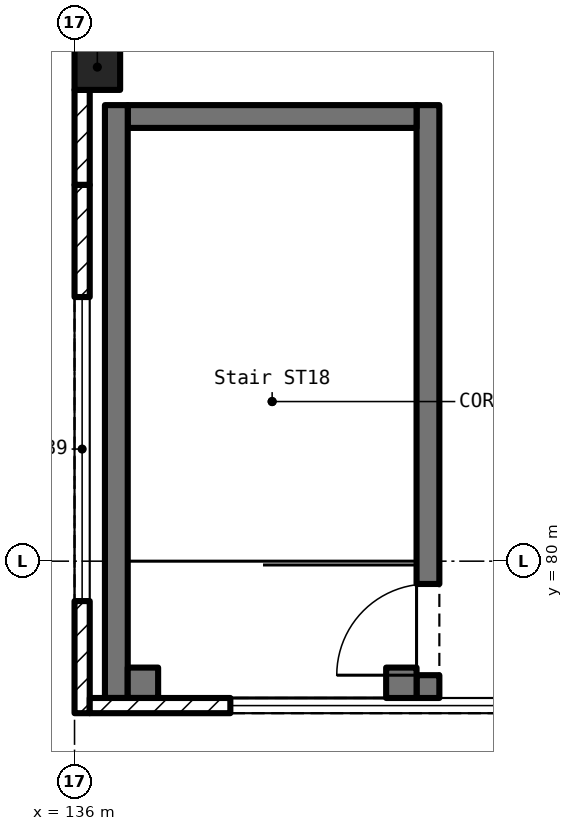
"""IFC4 building model, lengths in metres.
Left out: names, types, materials, properties, quantities, classifications, styles, units other than length and angle.
Written with IfcOpenShell. Run it as: python <this file> out.ifc"""

import sys

from ifc_helpers import new_model, si_unit, direction, frame, frame_2d, origin, origin_2d, place, context, subcontext, project, spatial, rectangle, extrude, element, fill, save


model = new_model("IFC4")
c1 = context("Model", 3, precision=1e-05, world=origin(), true_north=direction((0.0, 1.0)))
c2 = subcontext(c1, "Body", "Model", "MODEL_VIEW")
j1 = project(units=[si_unit("LENGTHUNIT", "METRE"), si_unit("PLANEANGLEUNIT", "RADIAN")], contexts=[c1])
p1 = place(None, origin())
s1 = spatial("IfcSite", under=j1, at=p1, CompositionType="ELEMENT")
p2 = place(p1, origin())
s2 = spatial("IfcBuilding", under=s1, at=p2, CompositionType="ELEMENT")
p3 = place(p2, frame((0.0, 0.0, 17.0)))
s3 = spatial("IfcBuildingStorey", under=s2, at=p3, CompositionType="ELEMENT", Elevation=17.0)
p4 = place(p3, frame((136.3, 86.5, 0.0), z_axis=(0.0, 0.0, 1.0), x_axis=(1.0, 0.0, 0.0)))
e1 = element("IfcColumn", 1, at=p4, inside=s3, PredefinedType="COLUMN", context=c2, shape_type="SweptSolid", body=[
    extrude(rectangle(XDim=0.6, YDim=0.6, at=origin_2d()), origin(), (0.0, 0.0, 1.0), 5.5),
])
p5 = place(p3, frame((136.1, 86.2, 0.0), z_axis=(0.0, 0.0, 1.0), x_axis=(0.0, -1.0, 0.0)))
e2 = element("IfcWall", 2, at=p5, inside=s3, PredefinedType="SOLIDWALL", context=c2, shape_type="SweptSolid", body=[
    extrude(rectangle(XDim=1.25, YDim=0.2, at=frame_2d((0.625, 0.0))), origin(), (0.0, 0.0, 1.0), 4.45),
])
p6 = place(p3, frame((136.1, 84.95, 0.0), z_axis=(0.0, 0.0, 1.0), x_axis=(0.0, -1.0, 0.0)))
e3 = element("IfcWall", 3, at=p6, inside=s3, PredefinedType="SOLIDWALL", context=c2, shape_type="SweptSolid", body=[
    extrude(rectangle(XDim=6.95, YDim=0.2, at=frame_2d((3.475, 0.0))), origin(), (0.0, 0.0, 1.0), 4.45),
])
p7 = place(p6, frame((1.475, 0.0, 1.0)))
e4 = element("IfcOpeningElement", 4, at=p7, cuts=e3, PredefinedType="OPENING", context=c2, shape_type="SweptSolid", body=[
    extrude(rectangle(XDim=4.0, YDim=1.8, at=frame_2d((2.0, 0.9))), frame((0.0, 0.112, 0.0), z_axis=(0.0, -1.0, 0.0), x_axis=(1.0, 0.0, 0.0)), (0.0, 0.0, 1.0), 0.224),
])
p8 = place(p3, frame((136.2, 78.1, 0.0), z_axis=(0.0, 0.0, 1.0), x_axis=(1.0, 0.0, 0.0)))
e5 = element("IfcWall", 5, at=p8, inside=s3, PredefinedType="SOLIDWALL", context=c2, shape_type="SweptSolid", body=[
    extrude(rectangle(XDim=7.7, YDim=0.2, at=frame_2d((3.85, 0.0))), origin(), (0.0, 0.0, 1.0), 4.45),
])
p9 = place(p8, frame((1.85, 0.0, 1.0)))
e6 = element("IfcOpeningElement", 6, at=p9, cuts=e5, PredefinedType="OPENING", context=c2, shape_type="SweptSolid", body=[
    extrude(rectangle(XDim=4.0, YDim=1.8, at=frame_2d((2.0, 0.9))), frame((0.0, 0.112, 0.0), z_axis=(0.0, -1.0, 0.0), x_axis=(1.0, 0.0, 0.0)), (0.0, 0.0, 1.0), 0.224),
])
p10 = place(p3, frame((140.65, 78.2, 0.0), z_axis=(0.0, 0.0, 1.0), x_axis=(0.0, 1.0, 0.0)))
e7 = element("IfcWall", 7, at=p10, inside=s3, PredefinedType="SOLIDWALL", context=c2, shape_type="SweptSolid", body=[
    extrude(rectangle(XDim=7.8, YDim=0.3, at=frame_2d((3.9, 0.0))), origin(), (0.0, 0.0, 1.0), 5.25),
])
p11 = place(p10, frame((0.3, 0.0, 0.0)))
e8 = element("IfcOpeningElement", 8, at=p11, cuts=e7, PredefinedType="OPENING", context=c2, shape_type="SweptSolid", body=[
    extrude(rectangle(XDim=1.2, YDim=2.1, at=frame_2d((0.6, 1.05))), frame((0.0, 0.162, 0.0), z_axis=(0.0, -1.0, 0.0), x_axis=(1.0, 0.0, 0.0)), (0.0, 0.0, 1.0), 0.324),
])
p12 = place(p3, frame((140.5, 85.85, 0.0), z_axis=(0.0, 0.0, 1.0), x_axis=(-1.0, 0.0, 0.0)))
e9 = element("IfcWall", 9, at=p12, inside=s3, PredefinedType="SOLIDWALL", context=c2, shape_type="SweptSolid", body=[
    extrude(rectangle(XDim=3.8, YDim=0.3, at=frame_2d((1.9, 0.0))), origin(), (0.0, 0.0, 1.0), 5.25),
])
p13 = place(p3, frame((136.55, 86.0, 0.0), z_axis=(0.0, 0.0, 1.0), x_axis=(0.0, -1.0, 0.0)))
e10 = element("IfcWall", 10, at=p13, inside=s3, PredefinedType="SOLIDWALL", context=c2, shape_type="SweptSolid", body=[
    extrude(rectangle(XDim=7.8, YDim=0.3, at=frame_2d((3.9, 0.0))), origin(), (0.0, 0.0, 1.0), 5.25),
])
p14 = place(p3, frame((136.7, 78.4, 0.0), z_axis=(0.0, 0.0, 1.0), x_axis=(1.0, 0.0, 0.0)))
e11 = element("IfcWall", 11, at=p14, inside=s3, PredefinedType="SOLIDWALL", context=c2, shape_type="SweptSolid", body=[
    extrude(rectangle(XDim=0.4, YDim=0.4, at=frame_2d((0.2, 0.0))), origin(), (0.0, 0.0, 1.0), 5.25),
])
p15 = place(p3, frame((140.1, 78.4, 0.0), z_axis=(0.0, 0.0, 1.0), x_axis=(1.0, 0.0, 0.0)))
e12 = element("IfcWall", 12, at=p15, inside=s3, PredefinedType="SOLIDWALL", context=c2, shape_type="SweptSolid", body=[
    extrude(rectangle(XDim=0.4, YDim=0.4, at=frame_2d((0.2, 0.0))), origin(), (0.0, 0.0, 1.0), 5.25),
])
p16 = place(p7, origin())
e13 = element("IfcWindow", 13, at=p16, inside=s3, PartitioningType="DOUBLE_PANEL_VERTICAL", PredefinedType="WINDOW", context=c2, shape_type="SweptSolid", body=[
    extrude(rectangle(XDim=4.0, YDim=1.8, at=frame_2d((2.0, 0.9))), frame((0.0, 0.03, 0.0), z_axis=(0.0, -1.0, 0.0), x_axis=(1.0, 0.0, 0.0)), (0.0, 0.0, 1.0), 0.06),
])
fill(e4, e13)
p17 = place(p9, origin())
e14 = element("IfcWindow", 14, at=p17, inside=s3, PartitioningType="DOUBLE_PANEL_VERTICAL", PredefinedType="WINDOW", context=c2, shape_type="SweptSolid", body=[
    extrude(rectangle(XDim=4.0, YDim=1.8, at=frame_2d((2.0, 0.9))), frame((0.0, 0.03, 0.0), z_axis=(0.0, -1.0, 0.0), x_axis=(1.0, 0.0, 0.0)), (0.0, 0.0, 1.0), 0.06),
])
fill(e6, e14)
p18 = place(p11, origin())
e15 = element("IfcDoor", 15, at=p18, inside=s3, OperationType="SINGLE_SWING_LEFT", PredefinedType="DOOR", context=c2, shape_type="SweptSolid", body=[
    extrude(rectangle(XDim=1.2, YDim=2.1, at=frame_2d((0.6, 1.05))), frame((0.0, 0.025, 0.0), z_axis=(0.0, -1.0, 0.0), x_axis=(1.0, 0.0, 0.0)), (0.0, 0.0, 1.0), 0.05),
])
fill(e8, e15)
save(model, sys.argv[1])
